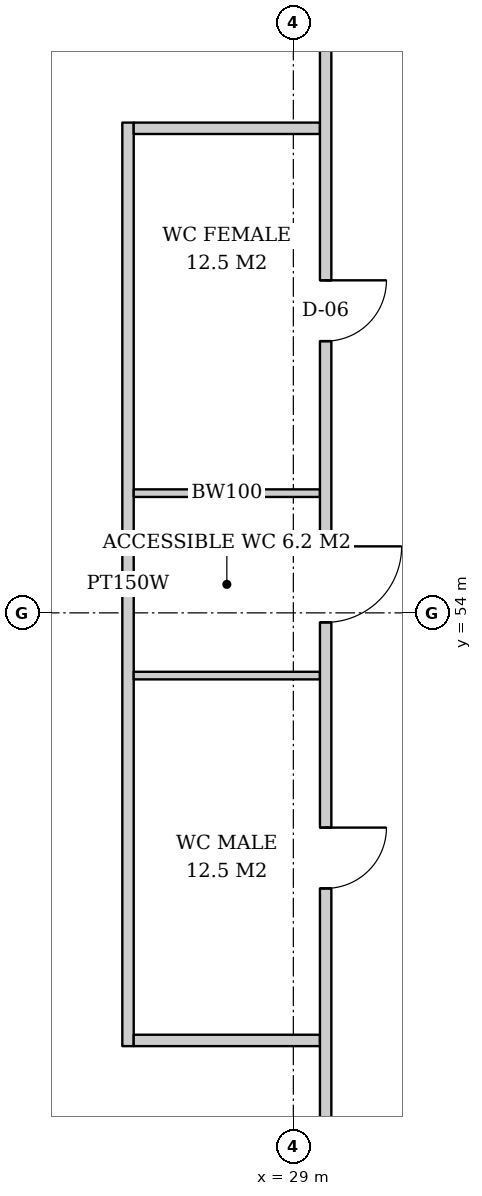
"""IFC4 building model, lengths in metres.
Left out: names, types, materials, properties, quantities, classifications, styles, units other than length and angle.
Written with IfcOpenShell. Run it as: python <this file> out.ifc"""

import sys

from ifc_helpers import new_model, si_unit, direction, frame, frame_2d, origin, place, context, subcontext, project, spatial, rectangle, extrude, element, fill, save


model = new_model("IFC4")
c1 = context("Model", 3, precision=1e-05, world=origin(), true_north=direction((0.0, 1.0)))
c2 = subcontext(c1, "Body", "Model", "MODEL_VIEW")
j1 = project(units=[si_unit("LENGTHUNIT", "METRE"), si_unit("PLANEANGLEUNIT", "RADIAN")], contexts=[c1])
p1 = place(None, origin())
s1 = spatial("IfcSite", under=j1, at=p1, CompositionType="ELEMENT")
p2 = place(p1, origin())
s2 = spatial("IfcBuilding", under=s1, at=p2, CompositionType="ELEMENT")
p3 = place(p2, frame((0.0, 0.0, 32.4)))
s3 = spatial("IfcBuildingStorey", under=s2, at=p3, CompositionType="ELEMENT", Elevation=32.4)
p4 = place(p3, frame((26.825, 60.45, 0.0), z_axis=(0.0, 0.0, 1.0), x_axis=(0.0, -1.0, 0.0)))
e1 = element("IfcWall", 1, at=p4, inside=s3, PredefinedType="PARTITIONING", context=c2, shape_type="SweptSolid", body=[
    extrude(rectangle(XDim=12.15, YDim=0.15, at=frame_2d((6.075, 0.0))), origin(), (0.0, 0.0, 1.0), 2.612),
])
p5 = place(p3, frame((29.35, 60.375, 0.0), z_axis=(0.0, 0.0, 1.0), x_axis=(-1.0, 0.0, 0.0)))
e2 = element("IfcWall", 2, at=p5, inside=s3, PredefinedType="PARTITIONING", context=c2, shape_type="SweptSolid", body=[
    extrude(rectangle(XDim=2.45, YDim=0.15, at=frame_2d((1.225, 0.0))), origin(), (0.0, 0.0, 1.0), 3.62),
])
for number, where, z_axis, x_axis in (
    (3, (29.35, 55.575, 0.0), (0.0, 0.0, 1.0), (-1.0, 0.0, 0.0)),
    (4, (29.35, 53.175, 0.0), (0.0, 0.0, 1.0), (-1.0, 0.0, 0.0)),
):
    element("IfcWall", number, at=place(p3, frame(where, z_axis=z_axis, x_axis=x_axis)), inside=s3, PredefinedType="SOLIDWALL", context=c2, shape_type="SweptSolid", body=[
        extrude(rectangle(XDim=2.45, YDim=0.1, at=frame_2d((1.225, 0.0))), origin(), (0.0, 0.0, 1.0), 3.62),
    ])
p6 = place(p3, frame((29.35, 48.375, 0.0), z_axis=(0.0, 0.0, 1.0), x_axis=(-1.0, 0.0, 0.0)))
e5 = element("IfcWall", 5, at=p6, inside=s3, PredefinedType="PARTITIONING", context=c2, shape_type="SweptSolid", body=[
    extrude(rectangle(XDim=2.45, YDim=0.15, at=frame_2d((1.225, 0.0))), origin(), (0.0, 0.0, 1.0), 3.62),
])
p7 = place(p3, frame((29.425, 61.65, 0.0), z_axis=(0.0, 0.0, 1.0), x_axis=(0.0, -1.0, 0.0)))
e6 = element("IfcWall", 6, at=p7, inside=s3, PredefinedType="PARTITIONING", context=c2, shape_type="SweptSolid", body=[
    extrude(rectangle(XDim=31.15, YDim=0.15, at=frame_2d((15.575, 0.0))), origin(), (0.0, 0.0, 1.0), 2.612),
])
p8 = place(p7, frame((3.275, 0.0, 0.0)))
e7 = element("IfcOpeningElement", 7, at=p8, cuts=e6, PredefinedType="OPENING", context=c2, shape_type="SweptSolid", body=[
    extrude(rectangle(XDim=0.8, YDim=2.1, at=frame_2d((0.4, 1.05))), frame((0.0, 0.085, 0.0), z_axis=(0.0, -1.0, 0.0), x_axis=(1.0, 0.0, 0.0)), (0.0, 0.0, 1.0), 0.17),
])
p9 = place(p7, frame((6.775, 0.0, 0.0)))
e8 = element("IfcOpeningElement", 8, at=p9, cuts=e6, PredefinedType="OPENING", context=c2, shape_type="SweptSolid", body=[
    extrude(rectangle(XDim=1.0, YDim=2.1, at=frame_2d((0.5, 1.05))), frame((0.0, 0.085, 0.0), z_axis=(0.0, -1.0, 0.0), x_axis=(1.0, 0.0, 0.0)), (0.0, 0.0, 1.0), 0.17),
])
p10 = place(p7, frame((10.475, 0.0, 0.0)))
e9 = element("IfcOpeningElement", 9, at=p10, cuts=e6, PredefinedType="OPENING", context=c2, shape_type="SweptSolid", body=[
    extrude(rectangle(XDim=0.8, YDim=2.1, at=frame_2d((0.4, 1.05))), frame((0.0, 0.085, 0.0), z_axis=(0.0, -1.0, 0.0), x_axis=(1.0, 0.0, 0.0)), (0.0, 0.0, 1.0), 0.17),
])
p11 = place(p8, origin())
e10 = element("IfcDoor", 10, at=p11, inside=s3, OperationType="SINGLE_SWING_LEFT", PredefinedType="DOOR", context=c2, shape_type="SweptSolid", body=[
    extrude(rectangle(XDim=0.8, YDim=2.1, at=frame_2d((0.4, 1.05))), frame((0.0, 0.025, 0.0), z_axis=(0.0, -1.0, 0.0), x_axis=(1.0, 0.0, 0.0)), (0.0, 0.0, 1.0), 0.05),
])
fill(e7, e10)
p12 = place(p9, origin())
e11 = element("IfcDoor", 11, at=p12, inside=s3, OperationType="SINGLE_SWING_LEFT", PredefinedType="DOOR", context=c2, shape_type="SweptSolid", body=[
    extrude(rectangle(XDim=1.0, YDim=2.1, at=frame_2d((0.5, 1.05))), frame((0.0, 0.025, 0.0), z_axis=(0.0, -1.0, 0.0), x_axis=(1.0, 0.0, 0.0)), (0.0, 0.0, 1.0), 0.05),
])
fill(e8, e11)
p13 = place(p10, origin())
e12 = element("IfcDoor", 12, at=p13, inside=s3, OperationType="SINGLE_SWING_LEFT", PredefinedType="DOOR", context=c2, shape_type="SweptSolid", body=[
    extrude(rectangle(XDim=0.8, YDim=2.1, at=frame_2d((0.4, 1.05))), frame((0.0, 0.025, 0.0), z_axis=(0.0, -1.0, 0.0), x_axis=(1.0, 0.0, 0.0)), (0.0, 0.0, 1.0), 0.05),
])
fill(e9, e12)
save(model, sys.argv[1])
